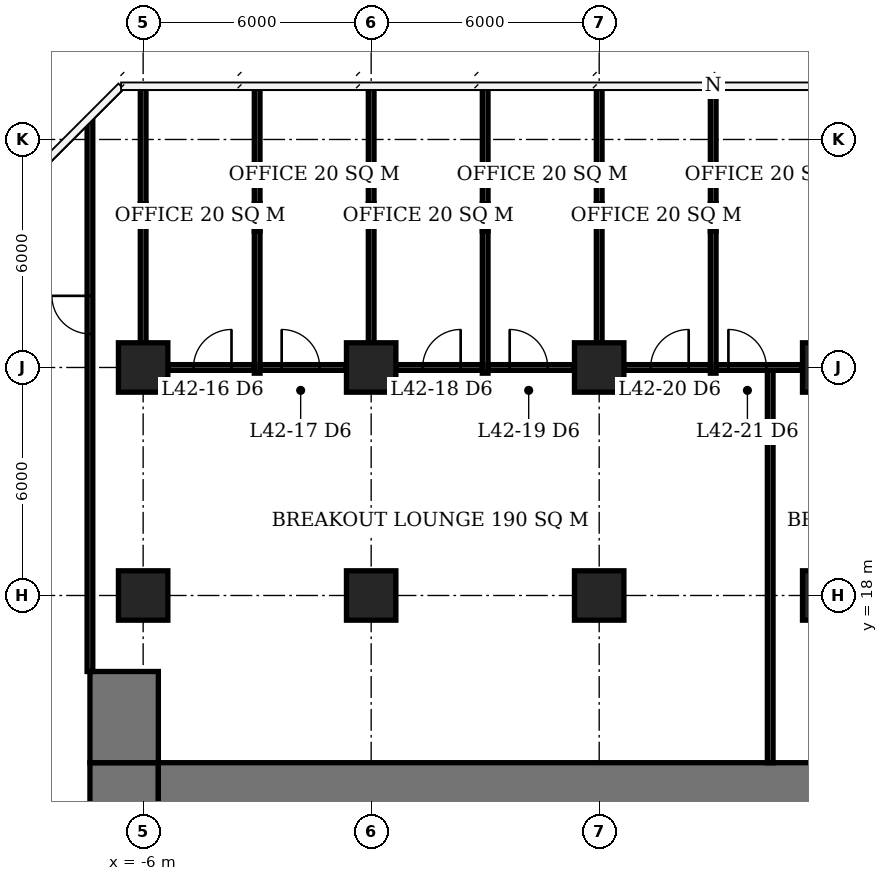
"""IFC4 building model, lengths in metres.
Left out: names, types, materials, properties, quantities, classifications, styles, units other than length and angle.
Written with IfcOpenShell. Run it as: python <this file> out.ifc"""

import sys

from ifc_helpers import new_model, si_unit, direction, frame, frame_2d, origin, origin_2d, place, context, subcontext, project, spatial, rectangle, extrude, element, fill, save


model = new_model("IFC4")
c1 = context("Model", 3, precision=1e-05, world=origin(), true_north=direction((0.0, 1.0)))
c2 = subcontext(c1, "Body", "Model", "MODEL_VIEW")
j1 = project(units=[si_unit("LENGTHUNIT", "METRE"), si_unit("PLANEANGLEUNIT", "RADIAN")], contexts=[c1])
p1 = place(None, origin())
s1 = spatial("IfcSite", under=j1, at=p1, CompositionType="ELEMENT")
p2 = place(p1, origin())
s2 = spatial("IfcBuilding", under=s1, at=p2, CompositionType="ELEMENT")
p3 = place(p2, frame((0.0, 0.0, 173.3)))
s3 = spatial("IfcBuildingStorey", under=s2, at=p3, CompositionType="ELEMENT", Elevation=173.3)
for number, where, z_axis, x_axis in (
    (1, (-6.0, 18.0, 0.0), (0.0, 0.0, 1.0), (1.0, 0.0, 0.0)),
    (2, (-6.0, 24.0, 0.0), (0.0, 0.0, 1.0), (1.0, 0.0, 0.0)),
    (3, (0.0, 18.0, 0.0), (0.0, 0.0, 1.0), (1.0, 0.0, 0.0)),
    (4, (0.0, 24.0, 0.0), (0.0, 0.0, 1.0), (1.0, 0.0, 0.0)),
    (5, (6.0, 18.0, 0.0), (0.0, 0.0, 1.0), (1.0, 0.0, 0.0)),
    (6, (6.0, 24.0, 0.0), (0.0, 0.0, 1.0), (1.0, 0.0, 0.0)),
    (7, (12.0, 18.0, 0.0), (0.0, 0.0, 1.0), (1.0, 0.0, 0.0)),
    (8, (12.0, 24.0, 0.0), (0.0, 0.0, 1.0), (1.0, 0.0, 0.0)),
):
    element("IfcColumn", number, at=place(p3, frame(where, z_axis=z_axis, x_axis=x_axis)), inside=s3, PredefinedType="COLUMN", context=c2, shape_type="SweptSolid", body=[
        extrude(rectangle(XDim=1.3, YDim=1.3, at=origin_2d()), origin(), (0.0, 0.0, 1.0), 3.9),
    ])
p4 = place(p3, frame((-5.6, 12.6, 0.0), z_axis=(0.0, 0.0, 1.0), x_axis=(1.0, 0.0, 0.0)))
e9 = element("IfcWall", 9, at=p4, inside=s3, PredefinedType="SHEAR", context=c2, shape_type="SweptSolid", body=[
    extrude(rectangle(XDim=23.2, YDim=2.0, at=frame_2d((11.6, 0.0))), origin(), (0.0, 0.0, 1.0), 3.9),
])
p5 = place(p3, frame((-6.5, -7.6, 0.0), z_axis=(0.0, 0.0, 1.0), x_axis=(0.0, 1.0, 0.0)))
e10 = element("IfcWall", 10, at=p5, inside=s3, PredefinedType="SHEAR", context=c2, shape_type="SweptSolid", body=[
    extrude(rectangle(XDim=21.2, YDim=1.8, at=frame_2d((10.6, 0.0))), origin(), (0.0, 0.0, 1.0), 3.9),
])
p6 = place(p5, frame((7.8, 0.0, 0.0)))
e11 = element("IfcOpeningElement", 11, at=p6, cuts=e10, PredefinedType="OPENING", context=c2, shape_type="SweptSolid", body=[
    extrude(rectangle(XDim=1.8, YDim=2.4, at=frame_2d((0.9, 1.2))), frame((0.0, 0.91, 0.0), z_axis=(0.0, -1.0, 0.0), x_axis=(1.0, 0.0, 0.0)), (0.0, 0.0, 1.0), 1.82),
])
p7 = place(p3, frame((-6.5, 13.6, 0.0), z_axis=(0.0, 0.0, 1.0), x_axis=(0.0, 1.0, 0.0)))
e12 = element("IfcWall", 12, at=p7, inside=s3, PredefinedType="SHEAR", context=c2, shape_type="SweptSolid", body=[
    extrude(rectangle(XDim=2.4, YDim=1.8, at=frame_2d((1.2, 0.0))), origin(), (0.0, 0.0, 1.0), 3.9),
])
p8 = place(p3, frame((-5.35, 24.0, 0.0), z_axis=(0.0, 0.0, 1.0), x_axis=(1.0, 0.0, 0.0)))
e13 = element("IfcWall", 13, at=p8, inside=s3, PredefinedType="PARTITIONING", context=c2, shape_type="SweptSolid", body=[
    extrude(rectangle(XDim=2.275, YDim=0.15, at=frame_2d((1.138, 0.0))), origin(), (0.0, 0.0, 1.0), 3.65),
])
p9 = place(p8, frame((0.675, 0.0, 0.0)))
e14 = element("IfcOpeningElement", 14, at=p9, cuts=e13, PredefinedType="OPENING", context=c2, shape_type="SweptSolid", body=[
    extrude(rectangle(XDim=1.0, YDim=2.1, at=frame_2d((0.5, 1.05))), frame((0.0, 0.085, 0.0), z_axis=(0.0, -1.0, 0.0), x_axis=(1.0, 0.0, 0.0)), (0.0, 0.0, 1.0), 0.17),
])
p10 = place(p3, frame((-2.925, 24.0, 0.0), z_axis=(0.0, 0.0, 1.0), x_axis=(1.0, 0.0, 0.0)))
e15 = element("IfcWall", 15, at=p10, inside=s3, PredefinedType="PARTITIONING", context=c2, shape_type="SweptSolid", body=[
    extrude(rectangle(XDim=2.265, YDim=0.15, at=frame_2d((1.133, 0.0))), origin(), (0.0, 0.0, 1.0), 3.65),
])
p11 = place(p10, frame((0.57, 0.0, 0.0)))
e16 = element("IfcOpeningElement", 16, at=p11, cuts=e15, PredefinedType="OPENING", context=c2, shape_type="SweptSolid", body=[
    extrude(rectangle(XDim=1.0, YDim=2.1, at=frame_2d((0.5, 1.05))), frame((0.0, 0.085, 0.0), z_axis=(0.0, -1.0, 0.0), x_axis=(1.0, 0.0, 0.0)), (0.0, 0.0, 1.0), 0.17),
])
p12 = place(p3, frame((0.66, 24.0, 0.0), z_axis=(0.0, 0.0, 1.0), x_axis=(1.0, 0.0, 0.0)))
e17 = element("IfcWall", 17, at=p12, inside=s3, PredefinedType="PARTITIONING", context=c2, shape_type="SweptSolid", body=[
    extrude(rectangle(XDim=2.265, YDim=0.15, at=frame_2d((1.133, 0.0))), origin(), (0.0, 0.0, 1.0), 3.65),
])
p13 = place(p12, frame((0.695, 0.0, 0.0)))
e18 = element("IfcOpeningElement", 18, at=p13, cuts=e17, PredefinedType="OPENING", context=c2, shape_type="SweptSolid", body=[
    extrude(rectangle(XDim=1.0, YDim=2.1, at=frame_2d((0.5, 1.05))), frame((0.0, 0.085, 0.0), z_axis=(0.0, -1.0, 0.0), x_axis=(1.0, 0.0, 0.0)), (0.0, 0.0, 1.0), 0.17),
])
p14 = place(p3, frame((3.075, 24.0, 0.0), z_axis=(0.0, 0.0, 1.0), x_axis=(1.0, 0.0, 0.0)))
e19 = element("IfcWall", 19, at=p14, inside=s3, PredefinedType="PARTITIONING", context=c2, shape_type="SweptSolid", body=[
    extrude(rectangle(XDim=2.265, YDim=0.15, at=frame_2d((1.133, 0.0))), origin(), (0.0, 0.0, 1.0), 3.65),
])
p15 = place(p14, frame((0.57, 0.0, 0.0)))
e20 = element("IfcOpeningElement", 20, at=p15, cuts=e19, PredefinedType="OPENING", context=c2, shape_type="SweptSolid", body=[
    extrude(rectangle(XDim=1.0, YDim=2.1, at=frame_2d((0.5, 1.05))), frame((0.0, 0.085, 0.0), z_axis=(0.0, -1.0, 0.0), x_axis=(1.0, 0.0, 0.0)), (0.0, 0.0, 1.0), 0.17),
])
p16 = place(p3, frame((6.66, 24.0, 0.0), z_axis=(0.0, 0.0, 1.0), x_axis=(1.0, 0.0, 0.0)))
e21 = element("IfcWall", 21, at=p16, inside=s3, PredefinedType="PARTITIONING", context=c2, shape_type="SweptSolid", body=[
    extrude(rectangle(XDim=2.265, YDim=0.15, at=frame_2d((1.133, 0.0))), origin(), (0.0, 0.0, 1.0), 3.65),
])
p17 = place(p16, frame((0.695, 0.0, 0.0)))
e22 = element("IfcOpeningElement", 22, at=p17, cuts=e21, PredefinedType="OPENING", context=c2, shape_type="SweptSolid", body=[
    extrude(rectangle(XDim=1.0, YDim=2.1, at=frame_2d((0.5, 1.05))), frame((0.0, 0.085, 0.0), z_axis=(0.0, -1.0, 0.0), x_axis=(1.0, 0.0, 0.0)), (0.0, 0.0, 1.0), 0.17),
])
p18 = place(p3, frame((9.075, 24.0, 0.0), z_axis=(0.0, 0.0, 1.0), x_axis=(1.0, 0.0, 0.0)))
e23 = element("IfcWall", 23, at=p18, inside=s3, PredefinedType="PARTITIONING", context=c2, shape_type="SweptSolid", body=[
    extrude(rectangle(XDim=2.265, YDim=0.15, at=frame_2d((1.133, 0.0))), origin(), (0.0, 0.0, 1.0), 3.65),
])
p19 = place(p18, frame((0.325, 0.0, 0.0)))
e24 = element("IfcOpeningElement", 24, at=p19, cuts=e23, PredefinedType="OPENING", context=c2, shape_type="SweptSolid", body=[
    extrude(rectangle(XDim=1.0, YDim=2.1, at=frame_2d((0.5, 1.05))), frame((0.0, 0.085, 0.0), z_axis=(0.0, -1.0, 0.0), x_axis=(1.0, 0.0, 0.0)), (0.0, 0.0, 1.0), 0.17),
])
p20 = place(p3, frame((-6.0, 24.65, 0.0), z_axis=(0.0, 0.0, 1.0), x_axis=(0.0, 1.0, 0.0)))
e25 = element("IfcWall", 25, at=p20, inside=s3, PredefinedType="PARTITIONING", context=c2, shape_type="SweptSolid", body=[
    extrude(rectangle(XDim=3.66, YDim=0.15, at=frame_2d((1.83, 0.0))), origin(), (0.0, 0.0, 1.0), 2.65),
])
p21 = place(p3, frame((-6.0, 28.31, 0.0), z_axis=(0.0, 0.0, 1.0), x_axis=(0.0, 1.0, 0.0)))
e26 = element("IfcWall", 26, at=p21, inside=s3, PredefinedType="PARTITIONING", context=c2, shape_type="SweptSolid", body=[
    extrude(rectangle(XDim=3.09, YDim=0.15, at=frame_2d((1.545, 0.0))), origin(), (0.0, 0.0, 1.0), 3.65),
])
p22 = place(p3, frame((-3.0, 23.85, 0.0), z_axis=(0.0, 0.0, 1.0), x_axis=(0.0, 1.0, 0.0)))
e27 = element("IfcWall", 27, at=p22, inside=s3, PredefinedType="PARTITIONING", context=c2, shape_type="SweptSolid", body=[
    extrude(rectangle(XDim=3.74, YDim=0.15, at=frame_2d((1.87, 0.0))), origin(), (0.0, 0.0, 1.0), 3.65),
])
p23 = place(p3, frame((-3.0, 27.59, 0.0), z_axis=(0.0, 0.0, 1.0), x_axis=(0.0, 1.0, 0.0)))
e28 = element("IfcWall", 28, at=p23, inside=s3, PredefinedType="PARTITIONING", context=c2, shape_type="SweptSolid", body=[
    extrude(rectangle(XDim=0.72, YDim=0.15, at=frame_2d((0.36, 0.0))), origin(), (0.0, 0.0, 1.0), 2.65),
])
p24 = place(p3, frame((-3.0, 28.31, 0.0), z_axis=(0.0, 0.0, 1.0), x_axis=(0.0, 1.0, 0.0)))
e29 = element("IfcWall", 29, at=p24, inside=s3, PredefinedType="PARTITIONING", context=c2, shape_type="SweptSolid", body=[
    extrude(rectangle(XDim=3.09, YDim=0.15, at=frame_2d((1.545, 0.0))), origin(), (0.0, 0.0, 1.0), 3.65),
])
p25 = place(p3, frame((0.0, 24.65, 0.0), z_axis=(0.0, 0.0, 1.0), x_axis=(0.0, 1.0, 0.0)))
e30 = element("IfcWall", 30, at=p25, inside=s3, PredefinedType="PARTITIONING", context=c2, shape_type="SweptSolid", body=[
    extrude(rectangle(XDim=3.66, YDim=0.15, at=frame_2d((1.83, 0.0))), origin(), (0.0, 0.0, 1.0), 2.65),
])
p26 = place(p3, frame((0.0, 28.31, 0.0), z_axis=(0.0, 0.0, 1.0), x_axis=(0.0, 1.0, 0.0)))
e31 = element("IfcWall", 31, at=p26, inside=s3, PredefinedType="PARTITIONING", context=c2, shape_type="SweptSolid", body=[
    extrude(rectangle(XDim=3.09, YDim=0.15, at=frame_2d((1.545, 0.0))), origin(), (0.0, 0.0, 1.0), 3.65),
])
p27 = place(p3, frame((3.0, 23.85, 0.0), z_axis=(0.0, 0.0, 1.0), x_axis=(0.0, 1.0, 0.0)))
e32 = element("IfcWall", 32, at=p27, inside=s3, PredefinedType="PARTITIONING", context=c2, shape_type="SweptSolid", body=[
    extrude(rectangle(XDim=3.74, YDim=0.15, at=frame_2d((1.87, 0.0))), origin(), (0.0, 0.0, 1.0), 3.65),
])
p28 = place(p3, frame((3.0, 27.59, 0.0), z_axis=(0.0, 0.0, 1.0), x_axis=(0.0, 1.0, 0.0)))
e33 = element("IfcWall", 33, at=p28, inside=s3, PredefinedType="PARTITIONING", context=c2, shape_type="SweptSolid", body=[
    extrude(rectangle(XDim=0.72, YDim=0.15, at=frame_2d((0.36, 0.0))), origin(), (0.0, 0.0, 1.0), 2.65),
])
p29 = place(p3, frame((3.0, 28.31, 0.0), z_axis=(0.0, 0.0, 1.0), x_axis=(0.0, 1.0, 0.0)))
e34 = element("IfcWall", 34, at=p29, inside=s3, PredefinedType="PARTITIONING", context=c2, shape_type="SweptSolid", body=[
    extrude(rectangle(XDim=3.09, YDim=0.15, at=frame_2d((1.545, 0.0))), origin(), (0.0, 0.0, 1.0), 3.65),
])
p30 = place(p3, frame((6.0, 24.65, 0.0), z_axis=(0.0, 0.0, 1.0), x_axis=(0.0, 1.0, 0.0)))
e35 = element("IfcWall", 35, at=p30, inside=s3, PredefinedType="PARTITIONING", context=c2, shape_type="SweptSolid", body=[
    extrude(rectangle(XDim=3.66, YDim=0.15, at=frame_2d((1.83, 0.0))), origin(), (0.0, 0.0, 1.0), 2.65),
])
p31 = place(p3, frame((6.0, 28.31, 0.0), z_axis=(0.0, 0.0, 1.0), x_axis=(0.0, 1.0, 0.0)))
e36 = element("IfcWall", 36, at=p31, inside=s3, PredefinedType="PARTITIONING", context=c2, shape_type="SweptSolid", body=[
    extrude(rectangle(XDim=3.04, YDim=0.15, at=frame_2d((1.52, 0.0))), origin(), (0.0, 0.0, 1.0), 3.65),
])
p32 = place(p3, frame((9.0, 23.85, 0.0), z_axis=(0.0, 0.0, 1.0), x_axis=(0.0, 1.0, 0.0)))
e37 = element("IfcWall", 37, at=p32, inside=s3, PredefinedType="PARTITIONING", context=c2, shape_type="SweptSolid", body=[
    extrude(rectangle(XDim=3.74, YDim=0.15, at=frame_2d((1.87, 0.0))), origin(), (0.0, 0.0, 1.0), 3.65),
])
p33 = place(p3, frame((9.0, 27.59, 0.0), z_axis=(0.0, 0.0, 1.0), x_axis=(0.0, 1.0, 0.0)))
e38 = element("IfcWall", 38, at=p33, inside=s3, PredefinedType="PARTITIONING", context=c2, shape_type="SweptSolid", body=[
    extrude(rectangle(XDim=0.72, YDim=0.15, at=frame_2d((0.36, 0.0))), origin(), (0.0, 0.0, 1.0), 2.65),
])
p34 = place(p3, frame((9.0, 28.31, 0.0), z_axis=(0.0, 0.0, 1.0), x_axis=(0.0, 1.0, 0.0)))
e39 = element("IfcWall", 39, at=p34, inside=s3, PredefinedType="PARTITIONING", context=c2, shape_type="SweptSolid", body=[
    extrude(rectangle(XDim=3.04, YDim=0.15, at=frame_2d((1.52, 0.0))), origin(), (0.0, 0.0, 1.0), 3.65),
])
p35 = place(p3, frame((-7.4, 16.0, 0.0), z_axis=(0.0, 0.0, 1.0), x_axis=(0.0, 1.0, 0.0)))
e40 = element("IfcWall", 40, at=p35, inside=s3, PredefinedType="PARTITIONING", context=c2, shape_type="SweptSolid", body=[
    extrude(rectangle(XDim=14.489, YDim=0.15, at=frame_2d((7.245, 0.0))), origin(), (0.0, 0.0, 1.0), 3.65),
])
p36 = place(p35, frame((8.885, 0.0, 0.0)))
e41 = element("IfcOpeningElement", 41, at=p36, cuts=e40, PredefinedType="OPENING", context=c2, shape_type="SweptSolid", body=[
    extrude(rectangle(XDim=1.0, YDim=2.1, at=frame_2d((0.5, 1.05))), frame((0.0, 0.085, 0.0), z_axis=(0.0, -1.0, 0.0), x_axis=(1.0, 0.0, 0.0)), (0.0, 0.0, 1.0), 0.17),
])
p37 = place(p3, frame((10.5, 13.6, 0.0), z_axis=(0.0, 0.0, 1.0), x_axis=(0.0, 1.0, 0.0)))
e42 = element("IfcWall", 42, at=p37, inside=s3, PredefinedType="PARTITIONING", context=c2, shape_type="SweptSolid", body=[
    extrude(rectangle(XDim=10.325, YDim=0.15, at=frame_2d((5.163, 0.0))), origin(), (0.0, 0.0, 1.0), 3.65),
])
p38 = place(p9, origin())
e43 = element("IfcDoor", 43, at=p38, inside=s3, OperationType="SINGLE_SWING_RIGHT", PredefinedType="DOOR", context=c2, shape_type="SweptSolid", body=[
    extrude(rectangle(XDim=1.0, YDim=2.1, at=frame_2d((0.5, 1.05))), frame((0.0, 0.025, 0.0), z_axis=(0.0, -1.0, 0.0), x_axis=(1.0, 0.0, 0.0)), (0.0, 0.0, 1.0), 0.05),
])
fill(e14, e43)
p39 = place(p11, origin())
e44 = element("IfcDoor", 44, at=p39, inside=s3, OperationType="SINGLE_SWING_LEFT", PredefinedType="DOOR", context=c2, shape_type="SweptSolid", body=[
    extrude(rectangle(XDim=1.0, YDim=2.1, at=frame_2d((0.5, 1.05))), frame((0.0, 0.025, 0.0), z_axis=(0.0, -1.0, 0.0), x_axis=(1.0, 0.0, 0.0)), (0.0, 0.0, 1.0), 0.05),
])
fill(e16, e44)
p40 = place(p13, origin())
e45 = element("IfcDoor", 45, at=p40, inside=s3, OperationType="SINGLE_SWING_RIGHT", PredefinedType="DOOR", context=c2, shape_type="SweptSolid", body=[
    extrude(rectangle(XDim=1.0, YDim=2.1, at=frame_2d((0.5, 1.05))), frame((0.0, 0.025, 0.0), z_axis=(0.0, -1.0, 0.0), x_axis=(1.0, 0.0, 0.0)), (0.0, 0.0, 1.0), 0.05),
])
fill(e18, e45)
p41 = place(p15, origin())
e46 = element("IfcDoor", 46, at=p41, inside=s3, OperationType="SINGLE_SWING_LEFT", PredefinedType="DOOR", context=c2, shape_type="SweptSolid", body=[
    extrude(rectangle(XDim=1.0, YDim=2.1, at=frame_2d((0.5, 1.05))), frame((0.0, 0.025, 0.0), z_axis=(0.0, -1.0, 0.0), x_axis=(1.0, 0.0, 0.0)), (0.0, 0.0, 1.0), 0.05),
])
fill(e20, e46)
p42 = place(p17, origin())
e47 = element("IfcDoor", 47, at=p42, inside=s3, OperationType="SINGLE_SWING_RIGHT", PredefinedType="DOOR", context=c2, shape_type="SweptSolid", body=[
    extrude(rectangle(XDim=1.0, YDim=2.1, at=frame_2d((0.5, 1.05))), frame((0.0, 0.025, 0.0), z_axis=(0.0, -1.0, 0.0), x_axis=(1.0, 0.0, 0.0)), (0.0, 0.0, 1.0), 0.05),
])
fill(e22, e47)
p43 = place(p19, origin())
e48 = element("IfcDoor", 48, at=p43, inside=s3, OperationType="SINGLE_SWING_LEFT", PredefinedType="DOOR", context=c2, shape_type="SweptSolid", body=[
    extrude(rectangle(XDim=1.0, YDim=2.1, at=frame_2d((0.5, 1.05))), frame((0.0, 0.025, 0.0), z_axis=(0.0, -1.0, 0.0), x_axis=(1.0, 0.0, 0.0)), (0.0, 0.0, 1.0), 0.05),
])
fill(e24, e48)
p44 = place(p36, origin())
e49 = element("IfcDoor", 49, at=p44, inside=s3, OperationType="SINGLE_SWING_RIGHT", PredefinedType="DOOR", context=c2, shape_type="SweptSolid", body=[
    extrude(rectangle(XDim=1.0, YDim=2.1, at=frame_2d((0.5, 1.05))), frame((0.0, 0.025, 0.0), z_axis=(0.0, -1.0, 0.0), x_axis=(1.0, 0.0, 0.0)), (0.0, 0.0, 1.0), 0.05),
])
fill(e41, e49)
save(model, sys.argv[1])
